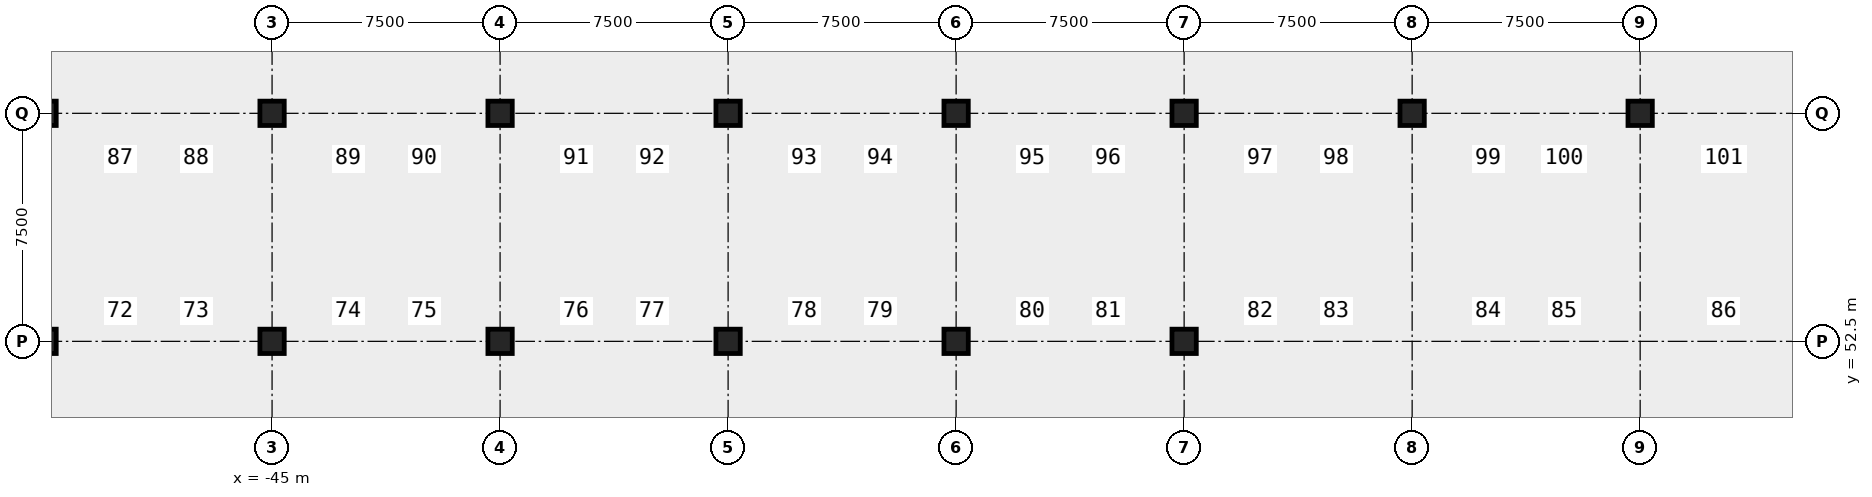
"""IFC4 building model, lengths in metres.
Left out: names, types, materials, properties, quantities, classifications, styles, units other than length and angle.
Written with IfcOpenShell. Run it as: python <this file> out.ifc"""

import sys

from ifc_helpers import new_model, si_unit, direction, frame, origin, origin_2d, place, context, subcontext, project, spatial, rectangle, extrude, element, save


model = new_model("IFC4")
c1 = context("Model", 3, precision=1e-05, world=origin(), true_north=direction((0.0, 1.0)))
c2 = subcontext(c1, "Body", "Model", "MODEL_VIEW")
j1 = project(units=[si_unit("LENGTHUNIT", "METRE"), si_unit("PLANEANGLEUNIT", "RADIAN")], contexts=[c1])
p1 = place(None, origin())
s1 = spatial("IfcSite", under=j1, at=p1, CompositionType="ELEMENT")
p2 = place(p1, origin())
s2 = spatial("IfcBuilding", under=s1, at=p2, CompositionType="ELEMENT")
p3 = place(p2, frame((0.0, 0.0, -16.5)))
s3 = spatial("IfcBuildingStorey", under=s2, at=p3, CompositionType="ELEMENT", Elevation=-16.5)
for number, where, z_axis, x_axis in (
    (1, (-52.5, 52.5, -0.4), (0.0, 0.0, 1.0), (1.0, 0.0, 0.0)),
    (2, (-52.5, 60.0, -0.4), (0.0, 0.0, 1.0), (1.0, 0.0, 0.0)),
    (3, (-45.0, 52.5, -0.4), (0.0, 0.0, 1.0), (1.0, 0.0, 0.0)),
    (4, (-45.0, 60.0, -0.4), (0.0, 0.0, 1.0), (1.0, 0.0, 0.0)),
    (5, (-37.5, 52.5, -0.4), (0.0, 0.0, 1.0), (1.0, 0.0, 0.0)),
    (6, (-37.5, 60.0, -0.4), (0.0, 0.0, 1.0), (1.0, 0.0, 0.0)),
    (7, (-30.0, 52.5, -0.4), (0.0, 0.0, 1.0), (1.0, 0.0, 0.0)),
    (8, (-30.0, 60.0, -0.4), (0.0, 0.0, 1.0), (1.0, 0.0, 0.0)),
    (9, (-22.5, 52.5, -0.4), (0.0, 0.0, 1.0), (1.0, 0.0, 0.0)),
    (10, (-22.5, 60.0, -0.4), (0.0, 0.0, 1.0), (1.0, 0.0, 0.0)),
    (11, (-15.0, 52.5, -0.4), (0.0, 0.0, 1.0), (1.0, 0.0, 0.0)),
    (12, (-15.0, 60.0, -0.4), (0.0, 0.0, 1.0), (1.0, 0.0, 0.0)),
    (13, (-7.5, 60.0, -0.4), (0.0, 0.0, 1.0), (1.0, 0.0, 0.0)),
    (14, (0.0, 60.0, -0.4), (0.0, 0.0, 1.0), (1.0, 0.0, 0.0)),
):
    element("IfcColumn", number, at=place(p3, frame(where, z_axis=z_axis, x_axis=x_axis)), inside=s3, PredefinedType="COLUMN", context=c2, shape_type="SweptSolid", body=[
        extrude(rectangle(XDim=0.8, YDim=0.8, at=origin_2d()), origin(), (0.0, 0.0, 1.0), 5.48),
    ])
save(model, sys.argv[1])
